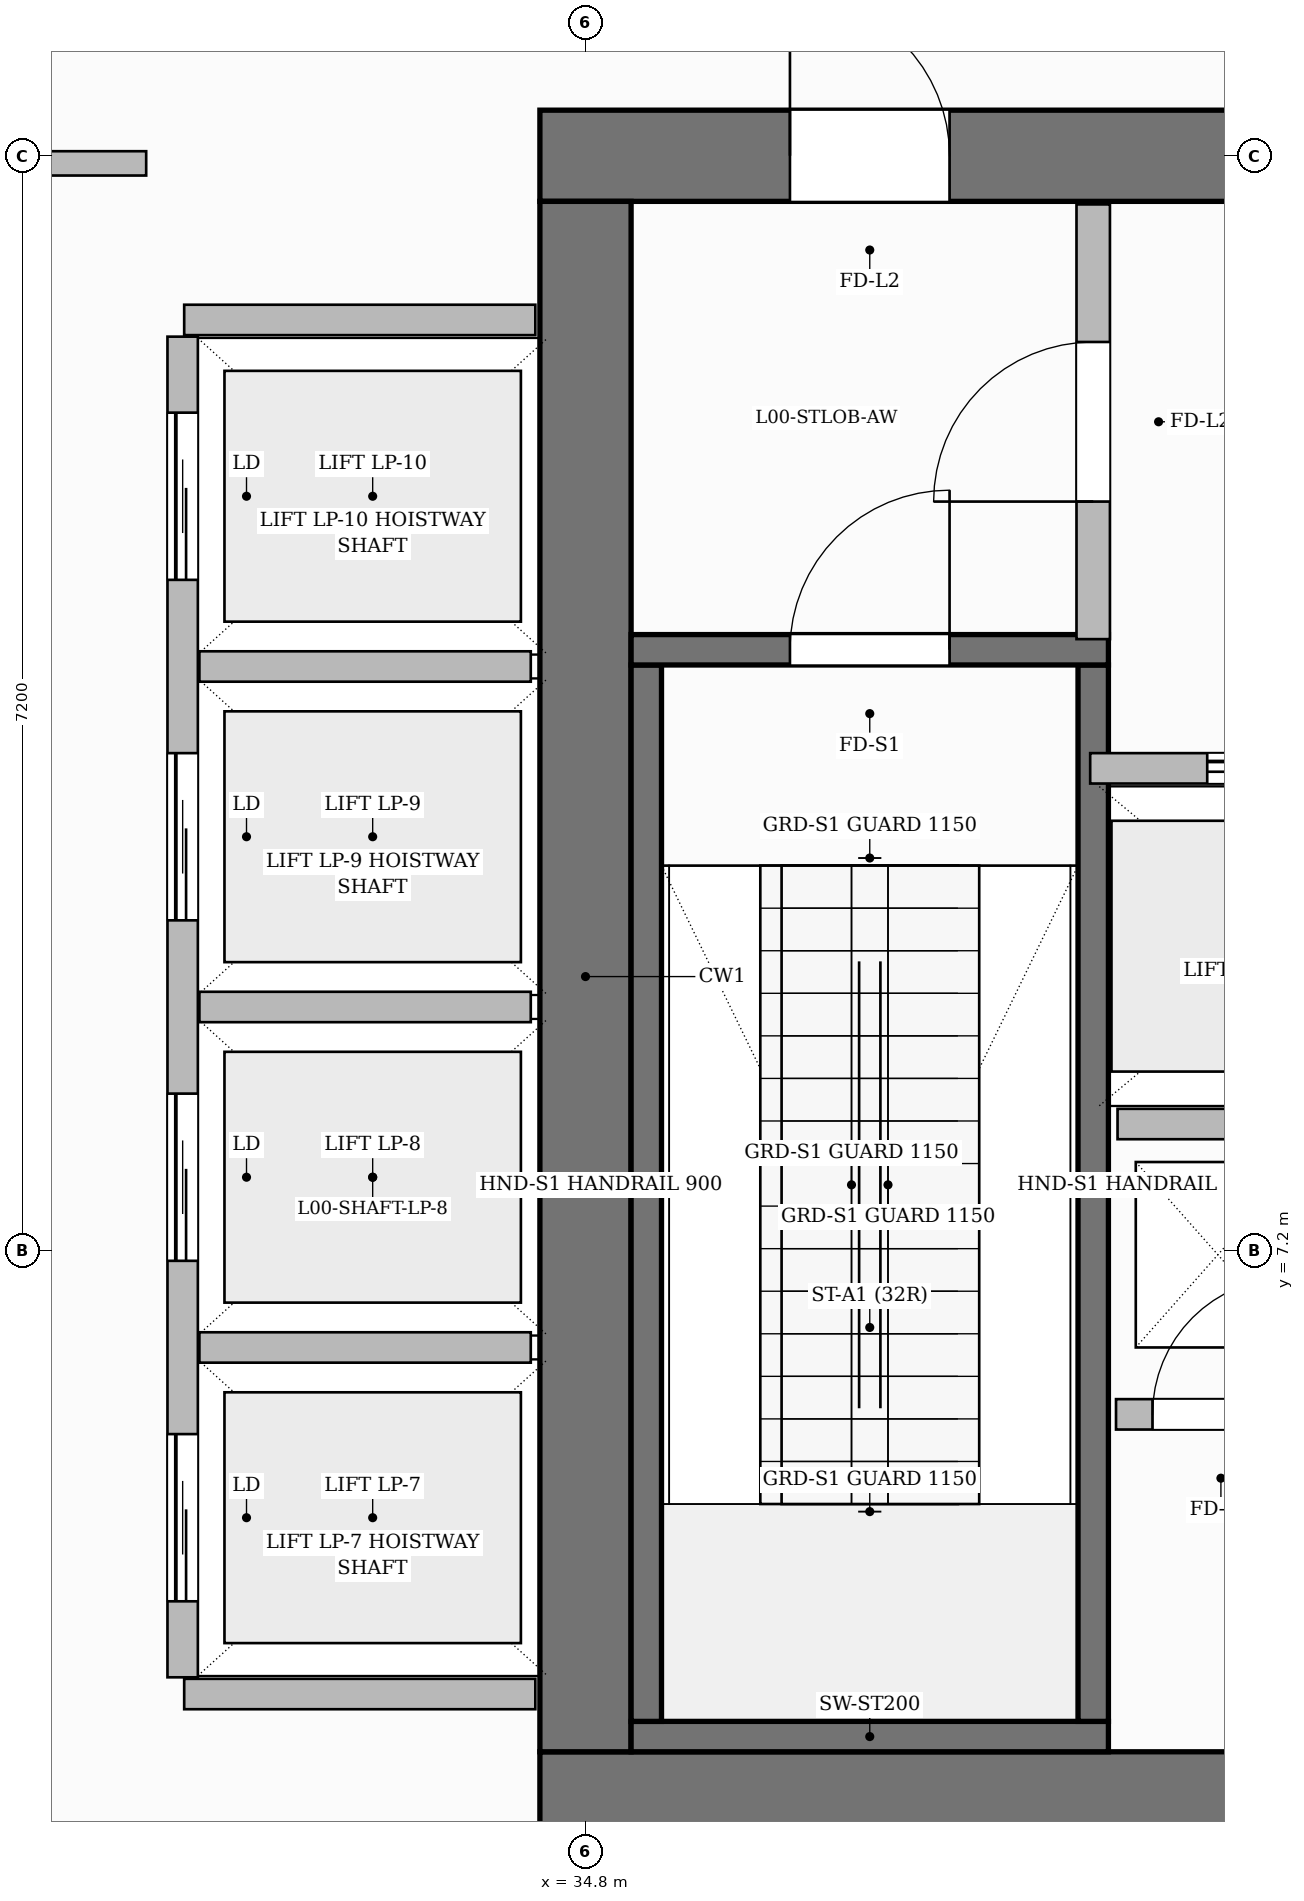
"""IFC4 building model, lengths in metres.
Left out: names, types, materials, properties, quantities, classifications, styles, units other than length and angle.
Written with IfcOpenShell. Run it as: python <this file> out.ifc"""

import sys

from ifc_helpers import new_model, si_unit, direction, frame, frame_2d, origin, place, context, subcontext, project, spatial, rectangle, extrude, source, transform, mapped, element, fill, save


model = new_model("IFC4")
c1 = context("Model", 3, precision=1e-05, world=origin(), true_north=direction((0.0, 1.0)))
c2 = subcontext(c1, "Body", "Model", "MODEL_VIEW")
j1 = project(units=[si_unit("LENGTHUNIT", "METRE"), si_unit("PLANEANGLEUNIT", "RADIAN")], contexts=[c1])
p1 = place(None, origin())
s1 = spatial("IfcSite", under=j1, at=p1, CompositionType="ELEMENT")
p2 = place(p1, origin())
s2 = spatial("IfcBuilding", under=s1, at=p2, CompositionType="ELEMENT")
p3 = place(p2, origin())
s3 = spatial("IfcBuildingStorey", under=s2, at=p3, CompositionType="ELEMENT", Elevation=0.0)
p4 = place(p3, frame((34.5, 3.6, 0.0), z_axis=(0.0, 0.0, 1.0), x_axis=(1.0, 0.0, 0.0)))
e1 = element("IfcWall", 1, at=p4, inside=s3, PredefinedType="SHEAR", context=c2, shape_type="SweptSolid", body=[
    extrude(rectangle(XDim=15.6, YDim=0.6, at=frame_2d((7.8, 0.0))), origin(), (0.0, 0.0, 1.0), 5.4),
])
p5 = place(p4, frame((4.77, 0.0, 0.0)))
e2 = element("IfcOpeningElement", 2, at=p5, cuts=e1, PredefinedType="OPENING", context=c2, shape_type="SweptSolid", body=[
    extrude(rectangle(XDim=0.9, YDim=2.1, at=frame_2d((0.45, 1.05))), frame((0.0, 0.31, 0.0), z_axis=(0.0, -1.0, 0.0), x_axis=(1.0, 0.0, 0.0)), (0.0, 0.0, 1.0), 0.62),
])
p6 = place(p4, frame((7.15, 0.0, 0.0)))
e3 = element("IfcOpeningElement", 3, at=p6, cuts=e1, PredefinedType="OPENING", context=c2, shape_type="SweptSolid", body=[
    extrude(rectangle(XDim=0.9, YDim=2.1, at=frame_2d((0.45, 1.05))), frame((0.0, 0.31, 0.0), z_axis=(0.0, -1.0, 0.0), x_axis=(1.0, 0.0, 0.0)), (0.0, 0.0, 1.0), 0.62),
])
p7 = place(p3, frame((34.5, 14.4, 0.0), z_axis=(0.0, 0.0, 1.0), x_axis=(1.0, 0.0, 0.0)))
e4 = element("IfcWall", 4, at=p7, inside=s3, PredefinedType="SHEAR", context=c2, shape_type="SweptSolid", body=[
    extrude(rectangle(XDim=15.6, YDim=0.6, at=frame_2d((7.8, 0.0))), origin(), (0.0, 0.0, 1.0), 5.4),
])
p8 = place(p7, frame((5.43, 0.0, 0.0)))
e5 = element("IfcOpeningElement", 5, at=p8, cuts=e4, PredefinedType="OPENING", context=c2, shape_type="SweptSolid", body=[
    extrude(rectangle(XDim=1.5, YDim=2.2, at=frame_2d((0.75, 1.1))), frame((0.0, 0.31, 0.0), z_axis=(0.0, -1.0, 0.0), x_axis=(1.0, 0.0, 0.0)), (0.0, 0.0, 1.0), 0.62),
])
p9 = place(p7, frame((1.645, 0.0, 0.0)))
e6 = element("IfcOpeningElement", 6, at=p9, cuts=e4, PredefinedType="OPENING", context=c2, shape_type="SweptSolid", body=[
    extrude(rectangle(XDim=1.05, YDim=2.15, at=frame_2d((0.525, 1.075))), frame((0.0, 0.31, 0.0), z_axis=(0.0, -1.0, 0.0), x_axis=(1.0, 0.0, 0.0)), (0.0, 0.0, 1.0), 0.62),
])
p10 = place(p7, frame((11.275, 0.0, 0.0)))
e7 = element("IfcOpeningElement", 7, at=p10, cuts=e4, PredefinedType="OPENING", context=c2, shape_type="SweptSolid", body=[
    extrude(rectangle(XDim=1.05, YDim=2.15, at=frame_2d((0.525, 1.075))), frame((0.0, 0.31, 0.0), z_axis=(0.0, -1.0, 0.0), x_axis=(1.0, 0.0, 0.0)), (0.0, 0.0, 1.0), 0.62),
])
p11 = place(p3, frame((34.8, 3.9, 0.0), z_axis=(0.0, 0.0, 1.0), x_axis=(0.0, 1.0, 0.0)))
e8 = element("IfcWall", 8, at=p11, inside=s3, PredefinedType="SHEAR", context=c2, shape_type="SweptSolid", body=[
    extrude(rectangle(XDim=10.2, YDim=0.6, at=frame_2d((5.1, 0.0))), origin(), (0.0, 0.0, 1.0), 5.4),
])
p12 = place(p3, frame((35.1, 4.0, 0.0), z_axis=(0.0, 0.0, 1.0), x_axis=(1.0, 0.0, 0.0)))
e9 = element("IfcWall", 9, at=p12, inside=s3, PredefinedType="SHEAR", context=c2, shape_type="SweptSolid", body=[
    extrude(rectangle(XDim=3.14, YDim=0.2, at=frame_2d((1.57, 0.0))), origin(), (0.0, 0.0, 1.0), 5.4),
])
for number, where, z_axis, x_axis in (
    (10, (35.2, 4.1, 0.0), (0.0, 0.0, 1.0), (0.0, 1.0, 0.0)),
    (11, (38.14, 4.1, 0.0), (0.0, 0.0, 1.0), (0.0, 1.0, 0.0)),
):
    element("IfcWall", number, at=place(p3, frame(where, z_axis=z_axis, x_axis=x_axis)), inside=s3, PredefinedType="SHEAR", context=c2, shape_type="SweptSolid", body=[
        extrude(rectangle(XDim=6.95, YDim=0.2, at=frame_2d((3.475, 0.0))), origin(), (0.0, 0.0, 1.0), 5.4),
    ])
p13 = place(p3, frame((35.1, 11.15, 0.0), z_axis=(0.0, 0.0, 1.0), x_axis=(1.0, 0.0, 0.0)))
e12 = element("IfcWall", 12, at=p13, inside=s3, PredefinedType="SHEAR", context=c2, shape_type="SweptSolid", body=[
    extrude(rectangle(XDim=3.14, YDim=0.2, at=frame_2d((1.57, 0.0))), origin(), (0.0, 0.0, 1.0), 5.4),
])
p14 = place(p13, frame((1.045, 0.0, 0.0)))
e13 = element("IfcOpeningElement", 13, at=p14, cuts=e12, PredefinedType="OPENING", context=c2, shape_type="SweptSolid", body=[
    extrude(rectangle(XDim=1.05, YDim=2.2, at=frame_2d((0.525, 1.1))), frame((0.0, 0.11, 0.0), z_axis=(0.0, -1.0, 0.0), x_axis=(1.0, 0.0, 0.0)), (0.0, 0.0, 1.0), 0.22),
])
p15 = place(p3, frame((38.3, 8.03, 0.0), z_axis=(0.0, 0.0, 1.0), x_axis=(1.0, 0.0, 0.0)))
e14 = element("IfcWall", 14, at=p15, inside=s3, PredefinedType="PARTITIONING", context=c2, shape_type="SweptSolid", body=[
    extrude(rectangle(XDim=4.74, YDim=0.2, at=frame_2d((2.37, 0.0))), origin(), (0.0, 0.0, 1.0), 5.1),
])
p16 = place(p3, frame((38.14, 11.22, 0.0), z_axis=(0.0, 0.0, 1.0), x_axis=(0.0, 1.0, 0.0)))
e15 = element("IfcWall", 15, at=p16, inside=s3, PredefinedType="PARTITIONING", context=c2, shape_type="SweptSolid", body=[
    extrude(rectangle(XDim=2.86, YDim=0.22, at=frame_2d((1.43, 0.0))), origin(), (0.0, 0.0, 1.0), 5.1),
])
p17 = place(p16, frame((0.905, 0.0, 0.0)))
e16 = element("IfcOpeningElement", 16, at=p17, cuts=e15, PredefinedType="OPENING", context=c2, shape_type="SweptSolid", body=[
    extrude(rectangle(XDim=1.05, YDim=2.15, at=frame_2d((0.525, 1.075))), frame((0.0, 0.12, 0.0), z_axis=(0.0, -1.0, 0.0), x_axis=(1.0, 0.0, 0.0)), (0.0, 0.0, 1.0), 0.24),
])
p18 = place(p3, frame((38.29, 6.12, 0.0), z_axis=(0.0, 0.0, 1.0), x_axis=(1.0, 0.0, 0.0)))
e17 = element("IfcWall", 17, at=p18, inside=s3, PredefinedType="PARTITIONING", context=c2, shape_type="SweptSolid", body=[
    extrude(rectangle(XDim=1.38, YDim=0.2, at=frame_2d((0.69, 0.0))), origin(), (0.0, 0.0, 1.0), 5.1),
])
p19 = place(p18, frame((0.24, 0.0, 0.0)))
e18 = element("IfcOpeningElement", 18, at=p19, cuts=e17, PredefinedType="OPENING", context=c2, shape_type="SweptSolid", body=[
    extrude(rectangle(XDim=0.9, YDim=2.1, at=frame_2d((0.45, 1.05))), frame((0.0, 0.11, 0.0), z_axis=(0.0, -1.0, 0.0), x_axis=(1.0, 0.0, 0.0)), (0.0, 0.0, 1.0), 0.22),
])
for number, where, z_axis, x_axis in (
    (19, (32.16, 4.28, 0.0), (0.0, 0.0, 1.0), (1.0, 0.0, 0.0)),
    (20, (32.16, 13.32, 0.0), (0.0, 0.0, 1.0), (1.0, 0.0, 0.0)),
):
    element("IfcWall", number, at=place(p3, frame(where, z_axis=z_axis, x_axis=x_axis)), inside=s3, PredefinedType="PARTITIONING", context=c2, shape_type="SweptSolid", body=[
        extrude(rectangle(XDim=2.31, YDim=0.2, at=frame_2d((1.155, 0.0))), origin(), (0.0, 0.0, 1.0), 5.1),
    ])
p20 = place(p3, frame((32.15, 4.39, 0.0), z_axis=(0.0, 0.0, 1.0), x_axis=(0.0, 1.0, 0.0)))
e21 = element("IfcWall", 21, at=p20, inside=s3, PredefinedType="PARTITIONING", context=c2, shape_type="SweptSolid", body=[
    extrude(rectangle(XDim=8.82, YDim=0.2, at=frame_2d((4.41, 0.0))), origin(), (0.0, 0.0, 1.0), 5.1),
])
p21 = place(p20, frame((0.5, 0.0, 0.0)))
e22 = element("IfcOpeningElement", 22, at=p21, cuts=e21, PredefinedType="OPENING", context=c2, shape_type="SweptSolid", body=[
    extrude(rectangle(XDim=1.1, YDim=2.2, at=frame_2d((0.55, 1.1))), frame((0.0, 0.11, 0.0), z_axis=(0.0, -1.0, 0.0), x_axis=(1.0, 0.0, 0.0)), (0.0, 0.0, 1.0), 0.22),
])
p22 = place(p20, frame((2.74, 0.0, 0.0)))
e23 = element("IfcOpeningElement", 23, at=p22, cuts=e21, PredefinedType="OPENING", context=c2, shape_type="SweptSolid", body=[
    extrude(rectangle(XDim=1.1, YDim=2.2, at=frame_2d((0.55, 1.1))), frame((0.0, 0.11, 0.0), z_axis=(0.0, -1.0, 0.0), x_axis=(1.0, 0.0, 0.0)), (0.0, 0.0, 1.0), 0.22),
])
p23 = place(p20, frame((4.98, 0.0, 0.0)))
e24 = element("IfcOpeningElement", 24, at=p23, cuts=e21, PredefinedType="OPENING", context=c2, shape_type="SweptSolid", body=[
    extrude(rectangle(XDim=1.1, YDim=2.2, at=frame_2d((0.55, 1.1))), frame((0.0, 0.11, 0.0), z_axis=(0.0, -1.0, 0.0), x_axis=(1.0, 0.0, 0.0)), (0.0, 0.0, 1.0), 0.22),
])
p24 = place(p20, frame((7.22, 0.0, 0.0)))
e25 = element("IfcOpeningElement", 25, at=p24, cuts=e21, PredefinedType="OPENING", context=c2, shape_type="SweptSolid", body=[
    extrude(rectangle(XDim=1.1, YDim=2.2, at=frame_2d((0.55, 1.1))), frame((0.0, 0.11, 0.0), z_axis=(0.0, -1.0, 0.0), x_axis=(1.0, 0.0, 0.0)), (0.0, 0.0, 1.0), 0.22),
])
for number, where, z_axis, x_axis in (
    (26, (32.26, 6.56, 0.0), (0.0, 0.0, 1.0), (1.0, 0.0, 0.0)),
    (27, (32.26, 8.8, 0.0), (0.0, 0.0, 1.0), (1.0, 0.0, 0.0)),
    (28, (32.26, 11.04, 0.0), (0.0, 0.0, 1.0), (1.0, 0.0, 0.0)),
):
    element("IfcWall", number, at=place(p3, frame(where, z_axis=z_axis, x_axis=x_axis)), inside=s3, PredefinedType="PARTITIONING", context=c2, shape_type="SweptSolid", body=[
        extrude(rectangle(XDim=2.18, YDim=0.2, at=frame_2d((1.09, 0.0))), origin(), (0.0, 0.0, 1.0), 5.1),
    ])
p25 = place(p3, frame((28.64, 14.35, 0.0), z_axis=(0.0, 0.0, 1.0), x_axis=(1.0, 0.0, 0.0)))
e29 = element("IfcWall", 29, at=p25, inside=s3, PredefinedType="PARTITIONING", context=c2, shape_type="SweptSolid", body=[
    extrude(rectangle(XDim=3.27, YDim=0.16, at=frame_2d((1.635, 0.0))), origin(), (0.0, 0.0, 1.0), 4.085),
])
p26 = place(p25, frame((0.935, 0.0, 0.0)))
e30 = element("IfcOpeningElement", 30, at=p26, cuts=e29, PredefinedType="OPENING", context=c2, shape_type="SweptSolid", body=[
    extrude(rectangle(XDim=1.4, YDim=2.35, at=frame_2d((0.7, 1.175))), frame((0.0, 0.09, 0.0), z_axis=(0.0, -1.0, 0.0), x_axis=(1.0, 0.0, 0.0)), (0.0, 0.0, 1.0), 0.18),
])
p27 = place(p3, frame((38.12, 10.37, 0.0), z_axis=(0.0, 0.0, 1.0), x_axis=(1.0, 0.0, 0.0)))
e31 = element("IfcWall", 31, at=p27, inside=s3, PredefinedType="PARTITIONING", context=c2, shape_type="SweptSolid", body=[
    extrude(rectangle(XDim=2.64, YDim=0.2, at=frame_2d((1.32, 0.0))), origin(), (0.0, 0.0, 1.0), 5.1),
])
p28 = place(p27, frame((0.77, 0.0, 0.0)))
e32 = element("IfcOpeningElement", 32, at=p28, cuts=e31, PredefinedType="OPENING", context=c2, shape_type="SweptSolid", body=[
    extrude(rectangle(XDim=1.1, YDim=2.2, at=frame_2d((0.55, 1.1))), frame((0.0, 0.11, 0.0), z_axis=(0.0, -1.0, 0.0), x_axis=(1.0, 0.0, 0.0)), (0.0, 0.0, 1.0), 0.22),
])
m1 = source(origin(), c2, "Body", "SweptSolid", [
    extrude(rectangle(XDim=1.05, YDim=2.2, at=frame_2d((0.525, 1.1))), frame((0.0, 0.025, 0.0), z_axis=(0.0, -1.0, 0.0), x_axis=(1.0, 0.0, 0.0)), (0.0, 0.0, 1.0), 0.05),
])
p29 = place(p14, origin())
e33 = element("IfcDoor", 33, at=p29, inside=s3, OperationType="SINGLE_SWING_RIGHT", PredefinedType="DOOR", context=c2, shape_type="MappedRepresentation", body=[
    mapped(m1, transform((0.0, 0.0, 0.0), scale=1.0)),
])
fill(e13, e33)
m2 = source(origin(), c2, "Body", "SweptSolid", [
    extrude(rectangle(XDim=1.05, YDim=2.15, at=frame_2d((0.525, 1.075))), frame((0.0, 0.025, 0.0), z_axis=(0.0, -1.0, 0.0), x_axis=(1.0, 0.0, 0.0)), (0.0, 0.0, 1.0), 0.05),
])
p30 = place(p17, origin())
e34 = element("IfcDoor", 34, at=p30, inside=s3, OperationType="SINGLE_SWING_LEFT", PredefinedType="DOOR", context=c2, shape_type="MappedRepresentation", body=[
    mapped(m2, transform((0.0, 0.0, 0.0), scale=1.0)),
])
fill(e16, e34)
p31 = place(p9, origin())
e35 = element("IfcDoor", 35, at=p31, inside=s3, OperationType="SINGLE_SWING_LEFT", PredefinedType="DOOR", context=c2, shape_type="MappedRepresentation", body=[
    mapped(m2, transform((0.0, 0.0, 0.0), scale=1.0)),
])
fill(e6, e35)
m3 = source(origin(), c2, "Body", "SweptSolid", [
    extrude(rectangle(XDim=0.9, YDim=2.1, at=frame_2d((0.45, 1.05))), frame((0.0, 0.025, 0.0), z_axis=(0.0, -1.0, 0.0), x_axis=(1.0, 0.0, 0.0)), (0.0, 0.0, 1.0), 0.05),
])
p32 = place(p19, origin())
e36 = element("IfcDoor", 36, at=p32, inside=s3, OperationType="SINGLE_SWING_RIGHT", PredefinedType="DOOR", context=c2, shape_type="MappedRepresentation", body=[
    mapped(m3, transform((0.0, 0.0, 0.0), scale=1.0)),
])
fill(e18, e36)
m4 = source(origin(), c2, "Body", "SweptSolid", [
    extrude(rectangle(XDim=1.1, YDim=2.2, at=frame_2d((0.55, 1.1))), frame((0.0, 0.025, 0.0), z_axis=(0.0, -1.0, 0.0), x_axis=(1.0, 0.0, 0.0)), (0.0, 0.0, 1.0), 0.05),
])
p33 = place(p28, origin())
e37 = element("IfcDoor", 37, at=p33, inside=s3, OperationType="SLIDING_TO_LEFT", PredefinedType="DOOR", context=c2, shape_type="MappedRepresentation", body=[
    mapped(m4, transform((0.0, 0.0, 0.0), scale=1.0)),
])
fill(e32, e37)
p34 = place(p21, origin())
e38 = element("IfcDoor", 38, at=p34, inside=s3, OperationType="SLIDING_TO_LEFT", PredefinedType="DOOR", context=c2, shape_type="MappedRepresentation", body=[
    mapped(m4, transform((0.0, 0.0, 0.0), scale=1.0)),
])
fill(e22, e38)
p35 = place(p22, origin())
e39 = element("IfcDoor", 39, at=p35, inside=s3, OperationType="SLIDING_TO_LEFT", PredefinedType="DOOR", context=c2, shape_type="MappedRepresentation", body=[
    mapped(m4, transform((0.0, 0.0, 0.0), scale=1.0)),
])
fill(e23, e39)
p36 = place(p23, origin())
e40 = element("IfcDoor", 40, at=p36, inside=s3, OperationType="SLIDING_TO_LEFT", PredefinedType="DOOR", context=c2, shape_type="MappedRepresentation", body=[
    mapped(m4, transform((0.0, 0.0, 0.0), scale=1.0)),
])
fill(e24, e40)
p37 = place(p24, origin())
e41 = element("IfcDoor", 41, at=p37, inside=s3, OperationType="SLIDING_TO_LEFT", PredefinedType="DOOR", context=c2, shape_type="MappedRepresentation", body=[
    mapped(m4, transform((0.0, 0.0, 0.0), scale=1.0)),
])
fill(e25, e41)
save(model, sys.argv[1])
